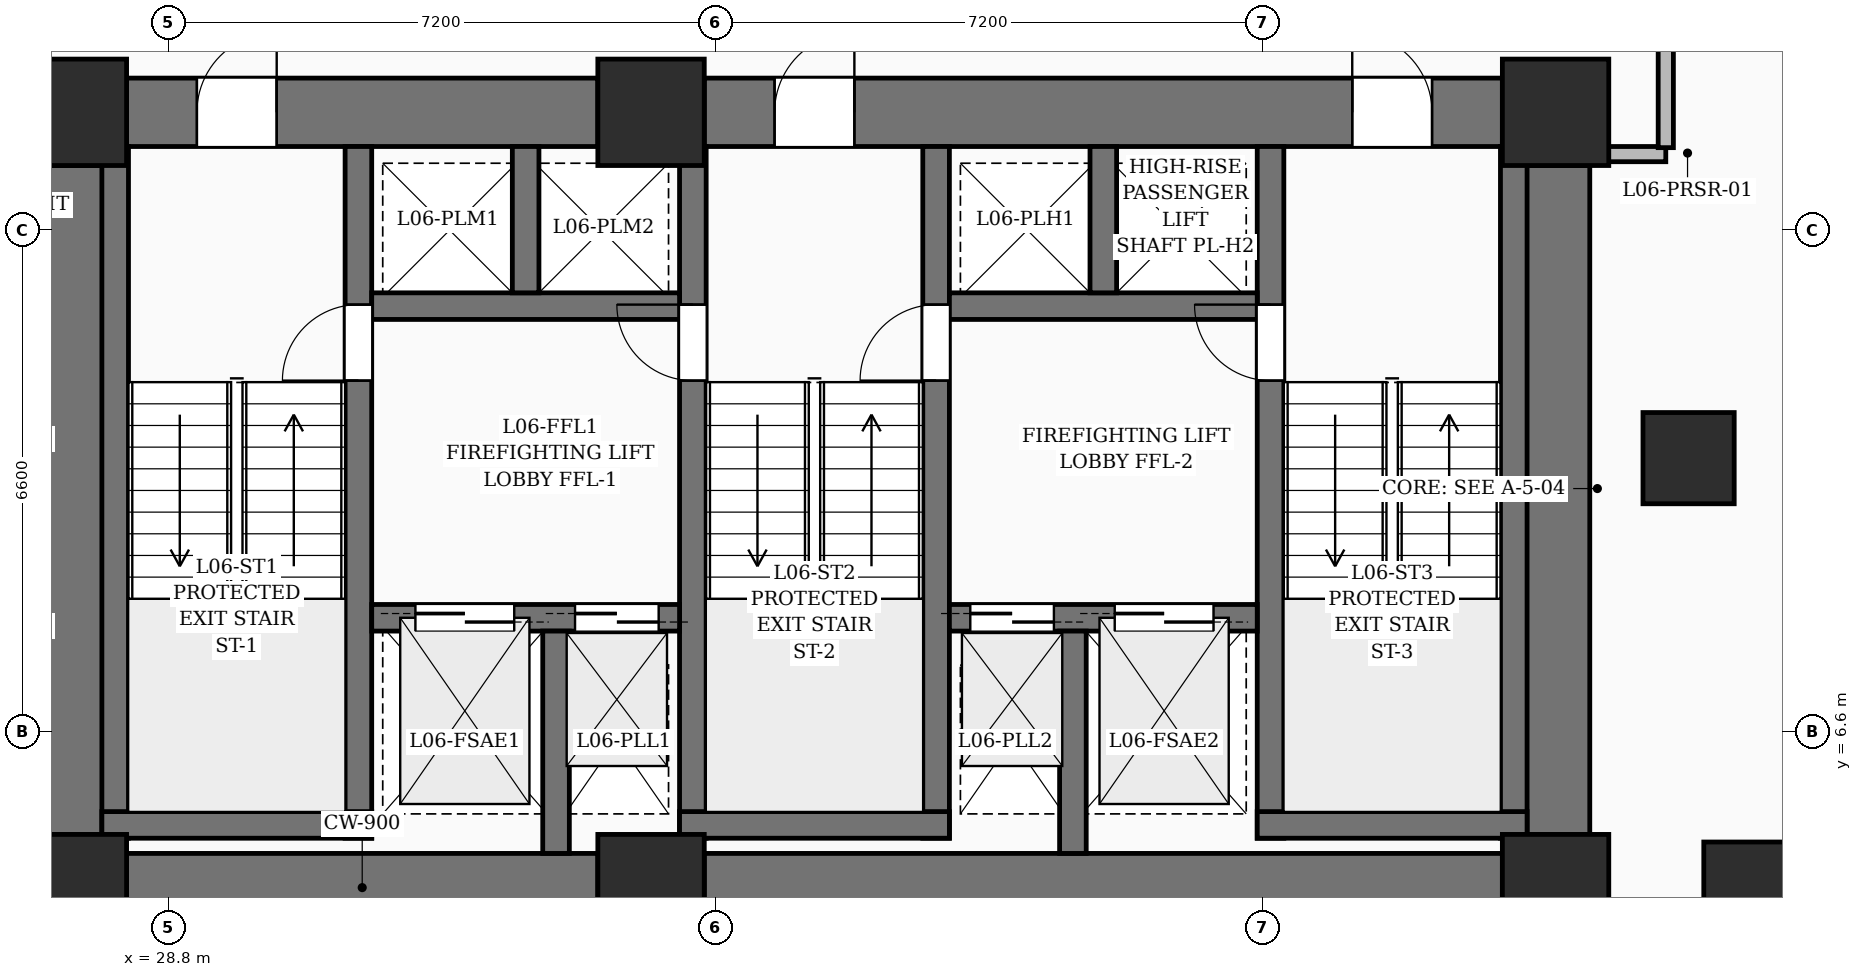
"""IFC4 building model, lengths in metres.
Left out: names, types, materials, properties, quantities, classifications, styles, units other than length and angle.
Written with IfcOpenShell. Run it as: python <this file> out.ifc"""

import sys

from ifc_helpers import new_model, si_unit, direction, frame, frame_2d, origin, origin_2d, place, context, subcontext, project, spatial, rectangle, extrude, element, fill, save


model = new_model("IFC4")
c1 = context("Model", 3, precision=1e-05, world=origin(), true_north=direction((0.0, 1.0)))
c2 = subcontext(c1, "Body", "Model", "MODEL_VIEW")
j1 = project(units=[si_unit("LENGTHUNIT", "METRE"), si_unit("PLANEANGLEUNIT", "RADIAN")], contexts=[c1])
p1 = place(None, origin())
s1 = spatial("IfcSite", under=j1, at=p1, CompositionType="ELEMENT")
p2 = place(p1, origin())
s2 = spatial("IfcBuilding", under=s1, at=p2, CompositionType="ELEMENT")
p3 = place(p2, frame((0.0, 0.0, 31.8)))
s3 = spatial("IfcBuildingStorey", under=s2, at=p3, CompositionType="ELEMENT", Elevation=31.8)
for number, where, z_axis, x_axis in (
    (1, (27.55, 4.55, 0.0), (0.0, 0.0, 1.0), (1.0, 0.0, 0.0)),
    (2, (35.15, 4.55, 0.0), (0.0, 0.0, 1.0), (1.0, 0.0, 0.0)),
    (3, (47.05, 4.55, 0.0), (0.0, 0.0, 1.0), (1.0, 0.0, 0.0)),
    (4, (27.55, 14.75, 0.0), (0.0, 0.0, 1.0), (1.0, 0.0, 0.0)),
    (5, (35.15, 14.75, 0.0), (0.0, 0.0, 1.0), (1.0, 0.0, 0.0)),
    (6, (47.05, 14.75, 0.0), (0.0, 0.0, 1.0), (1.0, 0.0, 0.0)),
):
    element("IfcColumn", number, at=place(p3, frame(where, z_axis=z_axis, x_axis=x_axis)), inside=s3, PredefinedType="COLUMN", context=c2, shape_type="SweptSolid", body=[
        extrude(rectangle(XDim=1.4, YDim=1.4, at=origin_2d()), origin(), (0.0, 0.0, 1.0), 3.6),
    ])
for number, where, z_axis, x_axis in (
    (7, (49.6, 4.55, 0.0), (0.0, 0.0, 1.0), (1.0, 0.0, 0.0)),
    (8, (48.8, 10.2, 0.0), (0.0, 0.0, 1.0), (1.0, 0.0, 0.0)),
):
    element("IfcColumn", number, at=place(p3, frame(where, z_axis=z_axis, x_axis=x_axis)), inside=s3, PredefinedType="COLUMN", context=c2, shape_type="SweptSolid", body=[
        extrude(rectangle(XDim=1.2, YDim=1.2, at=origin_2d()), origin(), (0.0, 0.0, 1.0), 3.6),
    ])
p4 = place(p3, frame((28.25, 4.55, 0.0), z_axis=(0.0, 0.0, 1.0), x_axis=(1.0, 0.0, 0.0)))
e9 = element("IfcWall", 9, at=p4, inside=s3, PredefinedType="SHEAR", context=c2, shape_type="SweptSolid", body=[
    extrude(rectangle(XDim=6.2, YDim=0.9, at=frame_2d((3.1, 0.0))), origin(), (0.0, 0.0, 1.0), 3.6),
])
p5 = place(p3, frame((35.85, 4.55, 0.0), z_axis=(0.0, 0.0, 1.0), x_axis=(1.0, 0.0, 0.0)))
e10 = element("IfcWall", 10, at=p5, inside=s3, PredefinedType="SHEAR", context=c2, shape_type="SweptSolid", body=[
    extrude(rectangle(XDim=10.5, YDim=0.9, at=frame_2d((5.25, 0.0))), origin(), (0.0, 0.0, 1.0), 3.6),
])
p6 = place(p3, frame((28.25, 14.75, 0.0), z_axis=(0.0, 0.0, 1.0), x_axis=(1.0, 0.0, 0.0)))
e11 = element("IfcWall", 11, at=p6, inside=s3, PredefinedType="SHEAR", context=c2, shape_type="SweptSolid", body=[
    extrude(rectangle(XDim=6.2, YDim=0.9, at=frame_2d((3.1, 0.0))), origin(), (0.0, 0.0, 1.0), 3.6),
])
p7 = place(p6, frame((0.925, 0.0, 0.0)))
e12 = element("IfcOpeningElement", 12, at=p7, cuts=e11, PredefinedType="OPENING", context=c2, shape_type="SweptSolid", body=[
    extrude(rectangle(XDim=1.05, YDim=2.15, at=frame_2d((0.525, 1.075))), frame((0.0, 0.46, 0.0), z_axis=(0.0, -1.0, 0.0), x_axis=(1.0, 0.0, 0.0)), (0.0, 0.0, 1.0), 0.92),
])
p8 = place(p3, frame((35.85, 14.75, 0.0), z_axis=(0.0, 0.0, 1.0), x_axis=(1.0, 0.0, 0.0)))
e13 = element("IfcWall", 13, at=p8, inside=s3, PredefinedType="SHEAR", context=c2, shape_type="SweptSolid", body=[
    extrude(rectangle(XDim=10.5, YDim=0.9, at=frame_2d((5.25, 0.0))), origin(), (0.0, 0.0, 1.0), 3.6),
])
p9 = place(p8, frame((0.925, 0.0, 0.0)))
e14 = element("IfcOpeningElement", 14, at=p9, cuts=e13, PredefinedType="OPENING", context=c2, shape_type="SweptSolid", body=[
    extrude(rectangle(XDim=1.05, YDim=2.15, at=frame_2d((0.525, 1.075))), frame((0.0, 0.46, 0.0), z_axis=(0.0, -1.0, 0.0), x_axis=(1.0, 0.0, 0.0)), (0.0, 0.0, 1.0), 0.92),
])
p10 = place(p8, frame((8.525, 0.0, 0.0)))
e15 = element("IfcOpeningElement", 15, at=p10, cuts=e13, PredefinedType="OPENING", context=c2, shape_type="SweptSolid", body=[
    extrude(rectangle(XDim=1.05, YDim=2.15, at=frame_2d((0.525, 1.075))), frame((0.0, 0.46, 0.0), z_axis=(0.0, -1.0, 0.0), x_axis=(1.0, 0.0, 0.0)), (0.0, 0.0, 1.0), 0.92),
])
for number, where, z_axis, x_axis in (
    (16, (27.55, 5.25, 0.0), (0.0, 0.0, 1.0), (0.0, 1.0, 0.0)),
    (17, (47.05, 5.25, 0.0), (0.0, 0.0, 1.0), (0.0, 1.0, 0.0)),
):
    element("IfcWall", number, at=place(p3, frame(where, z_axis=z_axis, x_axis=x_axis)), inside=s3, PredefinedType="SHEAR", context=c2, shape_type="SweptSolid", body=[
        extrude(rectangle(XDim=8.8, YDim=0.9, at=frame_2d((4.4, 0.0))), origin(), (0.0, 0.0, 1.0), 3.6),
    ])
p11 = place(p3, frame((28.1, 5.2, 0.0), z_axis=(0.0, 0.0, 1.0), x_axis=(0.0, 1.0, 0.0)))
e18 = element("IfcWall", 18, at=p11, inside=s3, PredefinedType="SOLIDWALL", context=c2, shape_type="SweptSolid", body=[
    extrude(rectangle(XDim=9.1, YDim=0.35, at=frame_2d((4.55, 0.0))), origin(), (0.0, 0.0, 1.0), 3.6),
])
p12 = place(p3, frame((31.3, 5.2, 0.0), z_axis=(0.0, 0.0, 1.0), x_axis=(0.0, 1.0, 0.0)))
e19 = element("IfcWall", 19, at=p12, inside=s3, PredefinedType="SOLIDWALL", context=c2, shape_type="SweptSolid", body=[
    extrude(rectangle(XDim=9.1, YDim=0.35, at=frame_2d((4.55, 0.0))), origin(), (0.0, 0.0, 1.0), 3.6),
])
p13 = place(p12, frame((6.02, 0.0, 0.0)))
e20 = element("IfcOpeningElement", 20, at=p13, cuts=e19, PredefinedType="OPENING", context=c2, shape_type="SweptSolid", body=[
    extrude(rectangle(XDim=1.0, YDim=2.15, at=frame_2d((0.5, 1.075))), frame((0.0, 0.185, 0.0), z_axis=(0.0, -1.0, 0.0), x_axis=(1.0, 0.0, 0.0)), (0.0, 0.0, 1.0), 0.37),
])
p14 = place(p3, frame((27.925, 5.375, 0.0), z_axis=(0.0, 0.0, 1.0), x_axis=(1.0, 0.0, 0.0)))
e21 = element("IfcWall", 21, at=p14, inside=s3, PredefinedType="SOLIDWALL", context=c2, shape_type="SweptSolid", body=[
    extrude(rectangle(XDim=3.55, YDim=0.35, at=frame_2d((1.775, 0.0))), origin(), (0.0, 0.0, 1.0), 3.6),
])
p15 = place(p3, frame((35.7, 5.2, 0.0), z_axis=(0.0, 0.0, 1.0), x_axis=(0.0, 1.0, 0.0)))
e22 = element("IfcWall", 22, at=p15, inside=s3, PredefinedType="SOLIDWALL", context=c2, shape_type="SweptSolid", body=[
    extrude(rectangle(XDim=9.1, YDim=0.35, at=frame_2d((4.55, 0.0))), origin(), (0.0, 0.0, 1.0), 3.6),
])
p16 = place(p15, frame((6.02, 0.0, 0.0)))
e23 = element("IfcOpeningElement", 23, at=p16, cuts=e22, PredefinedType="OPENING", context=c2, shape_type="SweptSolid", body=[
    extrude(rectangle(XDim=1.0, YDim=2.15, at=frame_2d((0.5, 1.075))), frame((0.0, 0.185, 0.0), z_axis=(0.0, -1.0, 0.0), x_axis=(1.0, 0.0, 0.0)), (0.0, 0.0, 1.0), 0.37),
])
p17 = place(p3, frame((38.9, 5.2, 0.0), z_axis=(0.0, 0.0, 1.0), x_axis=(0.0, 1.0, 0.0)))
e24 = element("IfcWall", 24, at=p17, inside=s3, PredefinedType="SOLIDWALL", context=c2, shape_type="SweptSolid", body=[
    extrude(rectangle(XDim=9.1, YDim=0.35, at=frame_2d((4.55, 0.0))), origin(), (0.0, 0.0, 1.0), 3.6),
])
p18 = place(p17, frame((6.02, 0.0, 0.0)))
e25 = element("IfcOpeningElement", 25, at=p18, cuts=e24, PredefinedType="OPENING", context=c2, shape_type="SweptSolid", body=[
    extrude(rectangle(XDim=1.0, YDim=2.15, at=frame_2d((0.5, 1.075))), frame((0.0, 0.185, 0.0), z_axis=(0.0, -1.0, 0.0), x_axis=(1.0, 0.0, 0.0)), (0.0, 0.0, 1.0), 0.37),
])
p19 = place(p3, frame((35.525, 5.375, 0.0), z_axis=(0.0, 0.0, 1.0), x_axis=(1.0, 0.0, 0.0)))
e26 = element("IfcWall", 26, at=p19, inside=s3, PredefinedType="SOLIDWALL", context=c2, shape_type="SweptSolid", body=[
    extrude(rectangle(XDim=3.55, YDim=0.35, at=frame_2d((1.775, 0.0))), origin(), (0.0, 0.0, 1.0), 3.6),
])
p20 = place(p3, frame((43.3, 5.2, 0.0), z_axis=(0.0, 0.0, 1.0), x_axis=(0.0, 1.0, 0.0)))
e27 = element("IfcWall", 27, at=p20, inside=s3, PredefinedType="SOLIDWALL", context=c2, shape_type="SweptSolid", body=[
    extrude(rectangle(XDim=9.1, YDim=0.35, at=frame_2d((4.55, 0.0))), origin(), (0.0, 0.0, 1.0), 3.6),
])
p21 = place(p20, frame((6.02, 0.0, 0.0)))
e28 = element("IfcOpeningElement", 28, at=p21, cuts=e27, PredefinedType="OPENING", context=c2, shape_type="SweptSolid", body=[
    extrude(rectangle(XDim=1.0, YDim=2.15, at=frame_2d((0.5, 1.075))), frame((0.0, 0.185, 0.0), z_axis=(0.0, -1.0, 0.0), x_axis=(1.0, 0.0, 0.0)), (0.0, 0.0, 1.0), 0.37),
])
p22 = place(p3, frame((46.5, 5.2, 0.0), z_axis=(0.0, 0.0, 1.0), x_axis=(0.0, 1.0, 0.0)))
e29 = element("IfcWall", 29, at=p22, inside=s3, PredefinedType="SOLIDWALL", context=c2, shape_type="SweptSolid", body=[
    extrude(rectangle(XDim=9.1, YDim=0.35, at=frame_2d((4.55, 0.0))), origin(), (0.0, 0.0, 1.0), 3.6),
])
p23 = place(p3, frame((43.125, 5.375, 0.0), z_axis=(0.0, 0.0, 1.0), x_axis=(1.0, 0.0, 0.0)))
e30 = element("IfcWall", 30, at=p23, inside=s3, PredefinedType="SOLIDWALL", context=c2, shape_type="SweptSolid", body=[
    extrude(rectangle(XDim=3.55, YDim=0.35, at=frame_2d((1.775, 0.0))), origin(), (0.0, 0.0, 1.0), 3.6),
])
p24 = place(p3, frame((31.475, 8.1, 0.0), z_axis=(0.0, 0.0, 1.0), x_axis=(1.0, 0.0, 0.0)))
e31 = element("IfcWall", 31, at=p24, inside=s3, PredefinedType="SOLIDWALL", context=c2, shape_type="SweptSolid", body=[
    extrude(rectangle(XDim=4.05, YDim=0.35, at=frame_2d((2.025, 0.0))), origin(), (0.0, 0.0, 1.0), 3.6),
])
p25 = place(p24, frame((0.575, 0.0, 0.0)))
e32 = element("IfcOpeningElement", 32, at=p25, cuts=e31, PredefinedType="OPENING", context=c2, shape_type="SweptSolid", body=[
    extrude(rectangle(XDim=1.3, YDim=2.25, at=frame_2d((0.65, 1.125))), frame((0.0, 0.185, 0.0), z_axis=(0.0, -1.0, 0.0), x_axis=(1.0, 0.0, 0.0)), (0.0, 0.0, 1.0), 0.37),
])
p26 = place(p24, frame((2.675, 0.0, 0.0)))
e33 = element("IfcOpeningElement", 33, at=p26, cuts=e31, PredefinedType="OPENING", context=c2, shape_type="SweptSolid", body=[
    extrude(rectangle(XDim=1.1, YDim=2.2, at=frame_2d((0.55, 1.1))), frame((0.0, 0.185, 0.0), z_axis=(0.0, -1.0, 0.0), x_axis=(1.0, 0.0, 0.0)), (0.0, 0.0, 1.0), 0.37),
])
p27 = place(p3, frame((39.075, 8.1, 0.0), z_axis=(0.0, 0.0, 1.0), x_axis=(1.0, 0.0, 0.0)))
e34 = element("IfcWall", 34, at=p27, inside=s3, PredefinedType="SOLIDWALL", context=c2, shape_type="SweptSolid", body=[
    extrude(rectangle(XDim=4.05, YDim=0.35, at=frame_2d((2.025, 0.0))), origin(), (0.0, 0.0, 1.0), 3.6),
])
p28 = place(p27, frame((2.175, 0.0, 0.0)))
e35 = element("IfcOpeningElement", 35, at=p28, cuts=e34, PredefinedType="OPENING", context=c2, shape_type="SweptSolid", body=[
    extrude(rectangle(XDim=1.3, YDim=2.25, at=frame_2d((0.65, 1.125))), frame((0.0, 0.185, 0.0), z_axis=(0.0, -1.0, 0.0), x_axis=(1.0, 0.0, 0.0)), (0.0, 0.0, 1.0), 0.37),
])
p29 = place(p27, frame((0.275, 0.0, 0.0)))
e36 = element("IfcOpeningElement", 36, at=p29, cuts=e34, PredefinedType="OPENING", context=c2, shape_type="SweptSolid", body=[
    extrude(rectangle(XDim=1.1, YDim=2.2, at=frame_2d((0.55, 1.1))), frame((0.0, 0.185, 0.0), z_axis=(0.0, -1.0, 0.0), x_axis=(1.0, 0.0, 0.0)), (0.0, 0.0, 1.0), 0.37),
])
for number, where, z_axis, x_axis in (
    (37, (33.9, 5.0, 0.0), (0.0, 0.0, 1.0), (0.0, 1.0, 0.0)),
    (38, (40.7, 5.0, 0.0), (0.0, 0.0, 1.0), (0.0, 1.0, 0.0)),
):
    element("IfcWall", number, at=place(p3, frame(where, z_axis=z_axis, x_axis=x_axis)), inside=s3, PredefinedType="SOLIDWALL", context=c2, shape_type="SweptSolid", body=[
        extrude(rectangle(XDim=2.925, YDim=0.35, at=frame_2d((1.462, 0.0))), origin(), (0.0, 0.0, 1.0), 3.6),
    ])
p30 = place(p3, frame((31.475, 12.2, 0.0), z_axis=(0.0, 0.0, 1.0), x_axis=(1.0, 0.0, 0.0)))
e39 = element("IfcWall", 39, at=p30, inside=s3, PredefinedType="SOLIDWALL", context=c2, shape_type="SweptSolid", body=[
    extrude(rectangle(XDim=4.05, YDim=0.35, at=frame_2d((2.025, 0.0))), origin(), (0.0, 0.0, 1.0), 3.6),
])
p31 = place(p3, frame((33.5, 12.375, 0.0), z_axis=(0.0, 0.0, 1.0), x_axis=(0.0, 1.0, 0.0)))
e40 = element("IfcWall", 40, at=p31, inside=s3, PredefinedType="SOLIDWALL", context=c2, shape_type="SweptSolid", body=[
    extrude(rectangle(XDim=1.925, YDim=0.35, at=frame_2d((0.962, 0.0))), origin(), (0.0, 0.0, 1.0), 3.6),
])
p32 = place(p3, frame((39.075, 12.2, 0.0), z_axis=(0.0, 0.0, 1.0), x_axis=(1.0, 0.0, 0.0)))
e41 = element("IfcWall", 41, at=p32, inside=s3, PredefinedType="SOLIDWALL", context=c2, shape_type="SweptSolid", body=[
    extrude(rectangle(XDim=4.05, YDim=0.35, at=frame_2d((2.025, 0.0))), origin(), (0.0, 0.0, 1.0), 3.6),
])
p33 = place(p3, frame((41.1, 12.375, 0.0), z_axis=(0.0, 0.0, 1.0), x_axis=(0.0, 1.0, 0.0)))
e42 = element("IfcWall", 42, at=p33, inside=s3, PredefinedType="SOLIDWALL", context=c2, shape_type="SweptSolid", body=[
    extrude(rectangle(XDim=1.925, YDim=0.35, at=frame_2d((0.962, 0.0))), origin(), (0.0, 0.0, 1.0), 3.6),
])
p34 = place(p3, frame((47.5, 14.2, 0.0), z_axis=(0.0, 0.0, 1.0), x_axis=(1.0, 0.0, 0.0)))
e43 = element("IfcWall", 43, at=p34, inside=s3, PredefinedType="PARTITIONING", context=c2, shape_type="SweptSolid", body=[
    extrude(rectangle(XDim=1.0, YDim=0.2, at=frame_2d((0.5, 0.0))), origin(), (0.0, 0.0, 1.0), 3.35),
])
p35 = place(p3, frame((48.5, 14.285, 0.0), z_axis=(0.0, 0.0, 1.0), x_axis=(0.0, 1.0, 0.0)))
e44 = element("IfcWall", 44, at=p35, inside=s3, PredefinedType="PARTITIONING", context=c2, shape_type="SweptSolid", body=[
    extrude(rectangle(XDim=3.38, YDim=0.2, at=frame_2d((1.69, 0.0))), origin(), (0.0, 0.0, 1.0), 2.228),
])
p36 = place(p7, origin())
e45 = element("IfcDoor", 45, at=p36, inside=s3, OperationType="SINGLE_SWING_RIGHT", PredefinedType="DOOR", context=c2, shape_type="SweptSolid", body=[
    extrude(rectangle(XDim=1.05, YDim=2.15, at=frame_2d((0.525, 1.075))), frame((0.0, 0.025, 0.0), z_axis=(0.0, -1.0, 0.0), x_axis=(1.0, 0.0, 0.0)), (0.0, 0.0, 1.0), 0.05),
])
fill(e12, e45)
p37 = place(p9, origin())
e46 = element("IfcDoor", 46, at=p37, inside=s3, OperationType="SINGLE_SWING_RIGHT", PredefinedType="DOOR", context=c2, shape_type="SweptSolid", body=[
    extrude(rectangle(XDim=1.05, YDim=2.15, at=frame_2d((0.525, 1.075))), frame((0.0, 0.025, 0.0), z_axis=(0.0, -1.0, 0.0), x_axis=(1.0, 0.0, 0.0)), (0.0, 0.0, 1.0), 0.05),
])
fill(e14, e46)
p38 = place(p10, origin())
e47 = element("IfcDoor", 47, at=p38, inside=s3, OperationType="SINGLE_SWING_LEFT", PredefinedType="DOOR", context=c2, shape_type="SweptSolid", body=[
    extrude(rectangle(XDim=1.05, YDim=2.15, at=frame_2d((0.525, 1.075))), frame((0.0, 0.025, 0.0), z_axis=(0.0, -1.0, 0.0), x_axis=(1.0, 0.0, 0.0)), (0.0, 0.0, 1.0), 0.05),
])
fill(e15, e47)
p39 = place(p13, origin())
e48 = element("IfcDoor", 48, at=p39, inside=s3, OperationType="SINGLE_SWING_LEFT", PredefinedType="DOOR", context=c2, shape_type="SweptSolid", body=[
    extrude(rectangle(XDim=1.0, YDim=2.15, at=frame_2d((0.5, 1.075))), frame((0.0, 0.025, 0.0), z_axis=(0.0, -1.0, 0.0), x_axis=(1.0, 0.0, 0.0)), (0.0, 0.0, 1.0), 0.05),
])
fill(e20, e48)
p40 = place(p16, origin())
e49 = element("IfcDoor", 49, at=p40, inside=s3, OperationType="SINGLE_SWING_RIGHT", PredefinedType="DOOR", context=c2, shape_type="SweptSolid", body=[
    extrude(rectangle(XDim=1.0, YDim=2.15, at=frame_2d((0.5, 1.075))), frame((0.0, 0.025, 0.0), z_axis=(0.0, -1.0, 0.0), x_axis=(1.0, 0.0, 0.0)), (0.0, 0.0, 1.0), 0.05),
])
fill(e23, e49)
p41 = place(p18, origin())
e50 = element("IfcDoor", 50, at=p41, inside=s3, OperationType="SINGLE_SWING_LEFT", PredefinedType="DOOR", context=c2, shape_type="SweptSolid", body=[
    extrude(rectangle(XDim=1.0, YDim=2.15, at=frame_2d((0.5, 1.075))), frame((0.0, 0.025, 0.0), z_axis=(0.0, -1.0, 0.0), x_axis=(1.0, 0.0, 0.0)), (0.0, 0.0, 1.0), 0.05),
])
fill(e25, e50)
p42 = place(p21, origin())
e51 = element("IfcDoor", 51, at=p42, inside=s3, OperationType="SINGLE_SWING_RIGHT", PredefinedType="DOOR", context=c2, shape_type="SweptSolid", body=[
    extrude(rectangle(XDim=1.0, YDim=2.15, at=frame_2d((0.5, 1.075))), frame((0.0, 0.025, 0.0), z_axis=(0.0, -1.0, 0.0), x_axis=(1.0, 0.0, 0.0)), (0.0, 0.0, 1.0), 0.05),
])
fill(e28, e51)
p43 = place(p25, origin())
e52 = element("IfcDoor", 52, at=p43, inside=s3, OperationType="DOUBLE_DOOR_SLIDING", PredefinedType="DOOR", context=c2, shape_type="SweptSolid", body=[
    extrude(rectangle(XDim=1.3, YDim=2.25, at=frame_2d((0.65, 1.125))), frame((0.0, 0.025, 0.0), z_axis=(0.0, -1.0, 0.0), x_axis=(1.0, 0.0, 0.0)), (0.0, 0.0, 1.0), 0.05),
])
fill(e32, e52)
p44 = place(p28, origin())
e53 = element("IfcDoor", 53, at=p44, inside=s3, OperationType="DOUBLE_DOOR_SLIDING", PredefinedType="DOOR", context=c2, shape_type="SweptSolid", body=[
    extrude(rectangle(XDim=1.3, YDim=2.25, at=frame_2d((0.65, 1.125))), frame((0.0, 0.025, 0.0), z_axis=(0.0, -1.0, 0.0), x_axis=(1.0, 0.0, 0.0)), (0.0, 0.0, 1.0), 0.05),
])
fill(e35, e53)
p45 = place(p26, origin())
e54 = element("IfcDoor", 54, at=p45, inside=s3, OperationType="DOUBLE_DOOR_SLIDING", PredefinedType="DOOR", context=c2, shape_type="SweptSolid", body=[
    extrude(rectangle(XDim=1.1, YDim=2.2, at=frame_2d((0.55, 1.1))), frame((0.0, 0.025, 0.0), z_axis=(0.0, -1.0, 0.0), x_axis=(1.0, 0.0, 0.0)), (0.0, 0.0, 1.0), 0.05),
])
fill(e33, e54)
p46 = place(p29, origin())
e55 = element("IfcDoor", 55, at=p46, inside=s3, OperationType="DOUBLE_DOOR_SLIDING", PredefinedType="DOOR", context=c2, shape_type="SweptSolid", body=[
    extrude(rectangle(XDim=1.1, YDim=2.2, at=frame_2d((0.55, 1.1))), frame((0.0, 0.025, 0.0), z_axis=(0.0, -1.0, 0.0), x_axis=(1.0, 0.0, 0.0)), (0.0, 0.0, 1.0), 0.05),
])
fill(e36, e55)
save(model, sys.argv[1])
